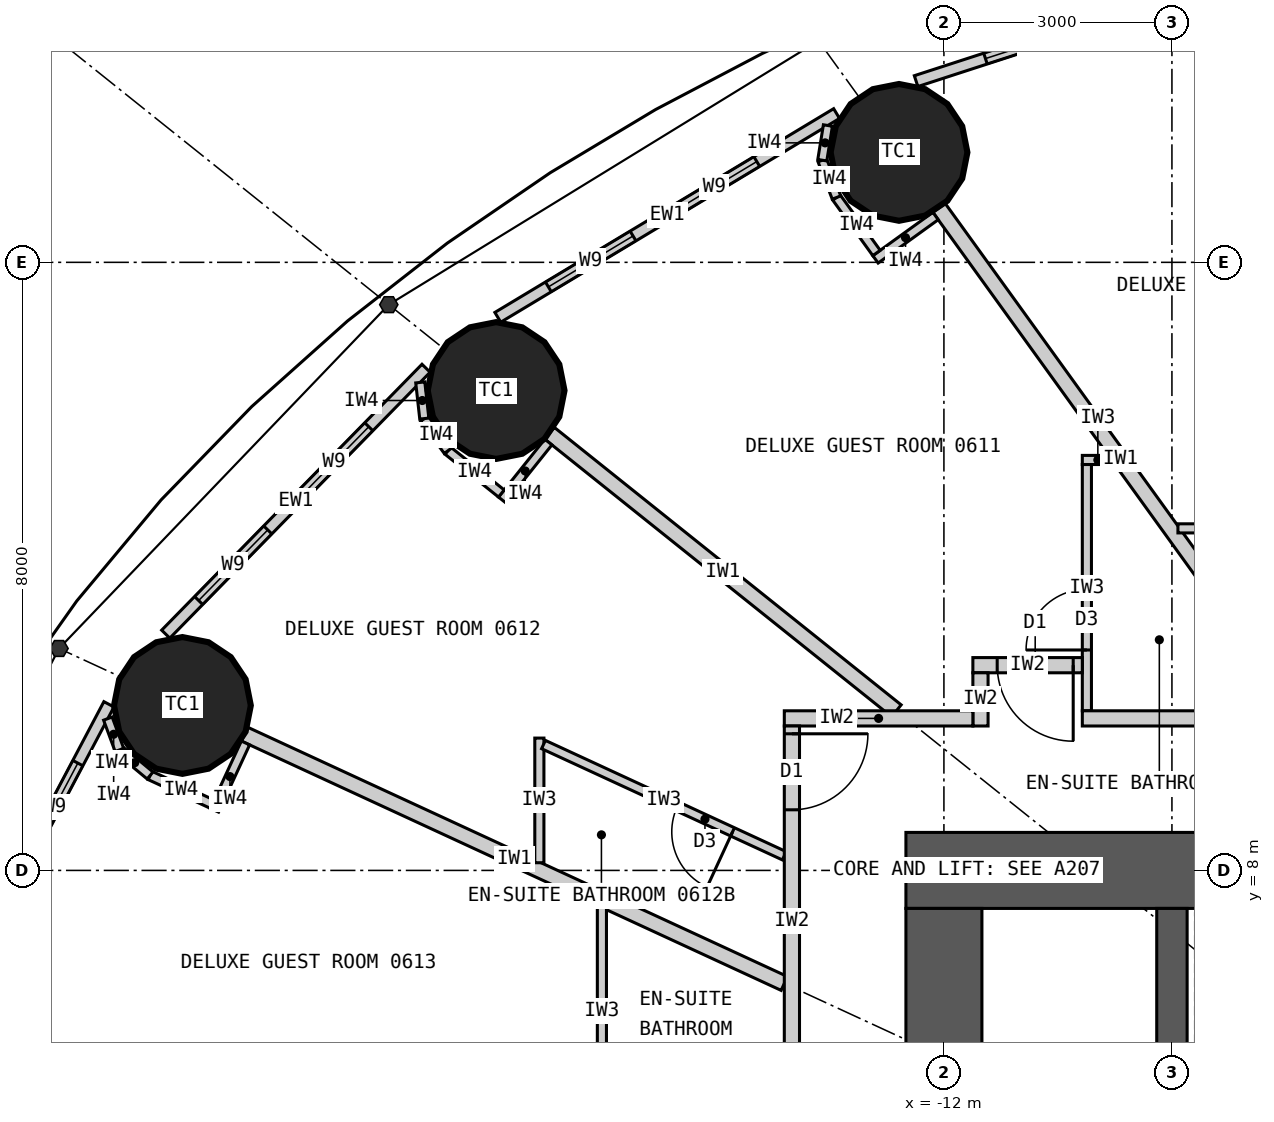
"""IFC4 building model, lengths in metres.
Left out: names, types, materials, properties, quantities, classifications, styles, units other than length and angle.
Written with IfcOpenShell. Run it as: python <this file> out.ifc"""

import sys

from ifc_helpers import new_model, si_unit, direction, frame, frame_2d, origin, origin_2d, place, context, subcontext, project, spatial, rectangle, circle, extrude, element, fill, save


model = new_model("IFC4")
c1 = context("Model", 3, precision=1e-05, world=origin(), true_north=direction((0.0, 1.0)))
c2 = subcontext(c1, "Body", "Model", "MODEL_VIEW")
j1 = project(units=[si_unit("LENGTHUNIT", "METRE"), si_unit("PLANEANGLEUNIT", "RADIAN")], contexts=[c1])
p1 = place(None, origin())
s1 = spatial("IfcSite", under=j1, at=p1, CompositionType="ELEMENT")
p2 = place(p1, origin())
s2 = spatial("IfcBuilding", under=s1, at=p2, CompositionType="ELEMENT")
p3 = place(p2, frame((0.0, 0.0, 32.7)))
s3 = spatial("IfcBuildingStorey", under=s2, at=p3, CompositionType="ELEMENT", Elevation=32.7)
for number, where, z_axis, x_axis in (
    (1, (-12.591, 17.447, 0.0), (0.0, 0.0, 1.0), (1.0, 0.0, 0.0)),
    (2, (-17.892, 14.313, 0.0), (0.0, 0.0, 1.0), (1.0, 0.0, 0.0)),
    (3, (-22.019, 10.17, 0.0), (0.0, 0.0, 1.0), (1.0, 0.0, 0.0)),
):
    element("IfcColumn", number, at=place(p3, frame(where, z_axis=z_axis, x_axis=x_axis)), inside=s3, PredefinedType="COLUMN", context=c2, shape_type="SweptSolid", body=[
        extrude(circle(Radius=0.9, at=origin_2d()), origin(), (0.0, 0.0, 1.0), 3.3),
    ])
p4 = place(p3, frame((-12.5, 8.0, 0.0), z_axis=(0.0, 0.0, 1.0), x_axis=(1.0, 0.0, 0.0)))
e4 = element("IfcWall", 4, at=p4, inside=s3, PredefinedType="SHEAR", context=c2, shape_type="SweptSolid", body=[
    extrude(rectangle(XDim=25.0, YDim=1.0, at=frame_2d((12.5, 0.0))), origin(), (0.0, 0.0, 1.0), 3.3),
])
p5 = place(p4, frame((11.2, 0.0, 0.0)))
e5 = element("IfcOpeningElement", 5, at=p5, cuts=e4, PredefinedType="OPENING", context=c2, shape_type="SweptSolid", body=[
    extrude(rectangle(XDim=1.2, YDim=2.2, at=frame_2d((0.6, 1.1))), frame((0.0, 0.51, 0.0), z_axis=(0.0, -1.0, 0.0), x_axis=(1.0, 0.0, 0.0)), (0.0, 0.0, 1.0), 1.02),
])
p6 = place(p4, frame((18.8, 0.0, 0.0)))
e6 = element("IfcOpeningElement", 6, at=p6, cuts=e4, PredefinedType="OPENING", context=c2, shape_type="SweptSolid", body=[
    extrude(rectangle(XDim=0.9, YDim=2.2, at=frame_2d((0.45, 1.1))), frame((0.0, 0.51, 0.0), z_axis=(0.0, -1.0, 0.0), x_axis=(1.0, 0.0, 0.0)), (0.0, 0.0, 1.0), 1.02),
])
p7 = place(p3, frame((-12.0, 7.5, 0.0), z_axis=(0.0, 0.0, 1.0), x_axis=(0.0, -1.0, 0.0)))
e7 = element("IfcWall", 7, at=p7, inside=s3, PredefinedType="SHEAR", context=c2, shape_type="SweptSolid", body=[
    extrude(rectangle(XDim=15.0, YDim=1.0, at=frame_2d((7.5, 0.0))), origin(), (0.0, 0.0, 1.0), 3.3),
])
p8 = place(p7, frame((6.6, 0.0, 0.0)))
e8 = element("IfcOpeningElement", 8, at=p8, cuts=e7, PredefinedType="OPENING", context=c2, shape_type="SweptSolid", body=[
    extrude(rectangle(XDim=1.8, YDim=2.2, at=frame_2d((0.9, 1.1))), frame((0.0, 0.51, 0.0), z_axis=(0.0, -1.0, 0.0), x_axis=(1.0, 0.0, 0.0)), (0.0, 0.0, 1.0), 1.02),
])
p9 = place(p3, frame((-9.0, 4.5, 0.0), z_axis=(0.0, 0.0, 1.0), x_axis=(0.0, 1.0, 0.0)))
e9 = element("IfcWall", 9, at=p9, inside=s3, PredefinedType="SHEAR", context=c2, shape_type="SweptSolid", body=[
    extrude(rectangle(XDim=3.0, YDim=0.4, at=frame_2d((1.5, 0.0))), origin(), (0.0, 0.0, 1.0), 3.3),
])
p10 = place(p3, frame((-7.188, 20.065, 0.0), z_axis=(0.0, 0.0, 1.0), x_axis=(-0.951138486029, -0.308764603532, 0.0)))
e10 = element("IfcWall", 10, at=p10, inside=s3, PredefinedType="ELEMENTEDWALL", context=c2, shape_type="SweptSolid", body=[
    extrude(rectangle(XDim=5.444, YDim=0.15, at=frame_2d((2.722, 0.0))), origin(), (0.0, 0.0, 1.0), 3.12),
])
p11 = place(p10, frame((1.284, 0.0, 0.9)))
e11 = element("IfcOpeningElement", 11, at=p11, cuts=e10, PredefinedType="OPENING", context=c2, shape_type="SweptSolid", body=[
    extrude(rectangle(XDim=1.3, YDim=1.9, at=frame_2d((0.65, 0.95))), frame((0.0, 0.085, 0.0), z_axis=(0.0, -1.0, 0.0), x_axis=(1.0, 0.0, 0.0)), (0.0, 0.0, 1.0), 0.17),
])
p12 = place(p10, frame((3.184, 0.0, 0.9)))
e12 = element("IfcOpeningElement", 12, at=p12, cuts=e10, PredefinedType="OPENING", context=c2, shape_type="SweptSolid", body=[
    extrude(rectangle(XDim=1.3, YDim=1.9, at=frame_2d((0.65, 0.95))), frame((0.0, 0.085, 0.0), z_axis=(0.0, -1.0, 0.0), x_axis=(1.0, 0.0, 0.0)), (0.0, 0.0, 1.0), 0.17),
])
p13 = place(p3, frame((-13.412, 17.957, 0.0), z_axis=(0.0, 0.0, 1.0), x_axis=(-0.856958191554, -0.515385931054, 0.0)))
e13 = element("IfcWall", 13, at=p13, inside=s3, PredefinedType="ELEMENTEDWALL", context=c2, shape_type="SweptSolid", body=[
    extrude(rectangle(XDim=5.201, YDim=0.15, at=frame_2d((2.601, 0.0))), origin(), (0.0, 0.0, 1.0), 3.12),
])
p14 = place(p13, frame((1.225, 0.0, 0.9)))
e14 = element("IfcOpeningElement", 14, at=p14, cuts=e13, PredefinedType="OPENING", context=c2, shape_type="SweptSolid", body=[
    extrude(rectangle(XDim=1.3, YDim=1.9, at=frame_2d((0.65, 0.95))), frame((0.0, 0.085, 0.0), z_axis=(0.0, -1.0, 0.0), x_axis=(1.0, 0.0, 0.0)), (0.0, 0.0, 1.0), 0.17),
])
p15 = place(p13, frame((3.125, 0.0, 0.9)))
e15 = element("IfcOpeningElement", 15, at=p15, cuts=e13, PredefinedType="OPENING", context=c2, shape_type="SweptSolid", body=[
    extrude(rectangle(XDim=1.3, YDim=1.9, at=frame_2d((0.65, 0.95))), frame((0.0, 0.085, 0.0), z_axis=(0.0, -1.0, 0.0), x_axis=(1.0, 0.0, 0.0)), (0.0, 0.0, 1.0), 0.17),
])
p16 = place(p3, frame((-18.813, 14.607, 0.0), z_axis=(0.0, 0.0, 1.0), x_axis=(-0.699612594083, -0.714522370679, 0.0)))
e16 = element("IfcWall", 16, at=p16, inside=s3, PredefinedType="ELEMENTEDWALL", context=c2, shape_type="SweptSolid", body=[
    extrude(rectangle(XDim=4.896, YDim=0.15, at=frame_2d((2.448, 0.0))), origin(), (0.0, 0.0, 1.0), 3.12),
])
p17 = place(p16, frame((1.077, 0.0, 0.9)))
e17 = element("IfcOpeningElement", 17, at=p17, cuts=e16, PredefinedType="OPENING", context=c2, shape_type="SweptSolid", body=[
    extrude(rectangle(XDim=1.3, YDim=1.9, at=frame_2d((0.65, 0.95))), frame((0.0, 0.085, 0.0), z_axis=(0.0, -1.0, 0.0), x_axis=(1.0, 0.0, 0.0)), (0.0, 0.0, 1.0), 0.17),
])
p18 = place(p16, frame((2.977, 0.0, 0.9)))
e18 = element("IfcOpeningElement", 18, at=p18, cuts=e16, PredefinedType="OPENING", context=c2, shape_type="SweptSolid", body=[
    extrude(rectangle(XDim=1.3, YDim=1.9, at=frame_2d((0.65, 0.95))), frame((0.0, 0.085, 0.0), z_axis=(0.0, -1.0, 0.0), x_axis=(1.0, 0.0, 0.0)), (0.0, 0.0, 1.0), 0.17),
])
p19 = place(p3, frame((-22.986, 10.185, 0.0), z_axis=(0.0, 0.0, 1.0), x_axis=(-0.467303182954, -0.884097129959, 0.0)))
e19 = element("IfcWall", 19, at=p19, inside=s3, PredefinedType="ELEMENTEDWALL", context=c2, shape_type="SweptSolid", body=[
    extrude(rectangle(XDim=4.606, YDim=0.15, at=frame_2d((2.303, 0.0))), origin(), (0.0, 0.0, 1.0), 3.12),
])
p20 = place(p19, frame((0.875, 0.0, 0.9)))
e20 = element("IfcOpeningElement", 20, at=p20, cuts=e19, PredefinedType="OPENING", context=c2, shape_type="SweptSolid", body=[
    extrude(rectangle(XDim=1.3, YDim=1.9, at=frame_2d((0.65, 0.95))), frame((0.0, 0.085, 0.0), z_axis=(0.0, -1.0, 0.0), x_axis=(1.0, 0.0, 0.0)), (0.0, 0.0, 1.0), 0.17),
])
p21 = place(p19, frame((2.775, 0.0, 0.9)))
e21 = element("IfcOpeningElement", 21, at=p21, cuts=e19, PredefinedType="OPENING", context=c2, shape_type="SweptSolid", body=[
    extrude(rectangle(XDim=1.3, YDim=1.9, at=frame_2d((0.65, 0.95))), frame((0.0, 0.085, 0.0), z_axis=(0.0, -1.0, 0.0), x_axis=(1.0, 0.0, 0.0)), (0.0, 0.0, 1.0), 0.17),
])
p22 = place(p3, frame((-7.289, 10.1, 0.0), z_axis=(0.0, 0.0, 1.0), x_axis=(-0.585216319319, 0.810877216108, 0.0)))
e22 = element("IfcWall", 22, at=p22, inside=s3, PredefinedType="PARTITIONING", context=c2, shape_type="SweptSolid", body=[
    extrude(rectangle(XDim=8.16, YDim=0.2, at=frame_2d((4.08, 0.0))), origin(), (0.0, 0.0, 1.0), 2.32),
])
p23 = place(p3, frame((-12.625, 10.1, 0.0), z_axis=(0.0, 0.0, 1.0), x_axis=(-0.780872884676, 0.624689953479, 0.0)))
e23 = element("IfcWall", 23, at=p23, inside=s3, PredefinedType="PARTITIONING", context=c2, shape_type="SweptSolid", body=[
    extrude(rectangle(XDim=5.845, YDim=0.2, at=frame_2d((2.922, 0.0))), origin(), (0.0, 0.0, 1.0), 2.32),
])
p24 = place(p3, frame((-14.1, 6.512, 0.0), z_axis=(0.0, 0.0, 1.0), x_axis=(-0.907842433118, 0.41931147925, 0.0)))
e24 = element("IfcWall", 24, at=p24, inside=s3, PredefinedType="PARTITIONING", context=c2, shape_type="SweptSolid", body=[
    extrude(rectangle(XDim=7.823, YDim=0.2, at=frame_2d((3.912, 0.0))), origin(), (0.0, 0.0, 1.0), 2.32),
])
p25 = place(p3, frame((-8.921, 12.5, 0.0), z_axis=(0.0, 0.0, 1.0), x_axis=(1.0, 0.0, 0.0)))
e25 = element("IfcWall", 25, at=p25, inside=s3, PredefinedType="PARTITIONING", context=c2, shape_type="SweptSolid", body=[
    extrude(rectangle(XDim=3.372, YDim=0.12, at=frame_2d((1.686, 0.0))), origin(), (0.0, 0.0, 1.0), 3.12),
])
p26 = place(p3, frame((-9.771, 13.4, 0.0), z_axis=(0.0, 0.0, 1.0), x_axis=(-1.0, 0.0, 0.0)))
e26 = element("IfcWall", 26, at=p26, inside=s3, PredefinedType="PARTITIONING", context=c2, shape_type="SweptSolid", body=[
    extrude(rectangle(XDim=0.408, YDim=0.12, at=frame_2d((0.204, 0.0))), origin(), (0.0, 0.0, 1.0), 3.12),
])
p27 = place(p3, frame((-10.119, 10.1, 0.0), z_axis=(0.0, 0.0, 1.0), x_axis=(0.0, 1.0, 0.0)))
e27 = element("IfcWall", 27, at=p27, inside=s3, PredefinedType="PARTITIONING", context=c2, shape_type="SweptSolid", body=[
    extrude(rectangle(XDim=3.24, YDim=0.12, at=frame_2d((1.62, 0.0))), origin(), (0.0, 0.0, 1.0), 3.12),
])
p28 = place(p27, frame((0.8, 0.0, 0.0)))
e28 = element("IfcOpeningElement", 28, at=p28, cuts=e27, PredefinedType="OPENING", context=c2, shape_type="SweptSolid", body=[
    extrude(rectangle(XDim=0.8, YDim=2.1, at=frame_2d((0.4, 1.05))), frame((0.0, 0.07, 0.0), z_axis=(0.0, -1.0, 0.0), x_axis=(1.0, 0.0, 0.0)), (0.0, 0.0, 1.0), 0.14),
])
p29 = place(p3, frame((-17.323, 8.101, 0.0), z_axis=(0.0, 0.0, 1.0), x_axis=(0.0, 1.0, 0.0)))
e29 = element("IfcWall", 29, at=p29, inside=s3, PredefinedType="PARTITIONING", context=c2, shape_type="SweptSolid", body=[
    extrude(rectangle(XDim=1.64, YDim=0.12, at=frame_2d((0.82, 0.0))), origin(), (0.0, 0.0, 1.0), 3.12),
])
p30 = place(p3, frame((-14.1, 8.193, 0.0), z_axis=(0.0, 0.0, 1.0), x_axis=(-0.907836493557, 0.419324338628, 0.0)))
e30 = element("IfcWall", 30, at=p30, inside=s3, PredefinedType="PARTITIONING", context=c2, shape_type="SweptSolid", body=[
    extrude(rectangle(XDim=3.49, YDim=0.12, at=frame_2d((1.745, 0.0))), origin(), (0.0, 0.0, 1.0), 3.12),
])
p31 = place(p30, frame((0.75, 0.0, 0.0)))
e31 = element("IfcOpeningElement", 31, at=p31, cuts=e30, PredefinedType="OPENING", context=c2, shape_type="SweptSolid", body=[
    extrude(rectangle(XDim=0.8, YDim=2.1, at=frame_2d((0.4, 1.05))), frame((0.0, 0.07, 0.0), z_axis=(0.0, -1.0, 0.0), x_axis=(1.0, 0.0, 0.0)), (0.0, 0.0, 1.0), 0.14),
])
p32 = place(p3, frame((-16.5, 7.521, 0.0), z_axis=(0.0, 0.0, 1.0), x_axis=(0.0, -1.0, 0.0)))
e32 = element("IfcWall", 32, at=p32, inside=s3, PredefinedType="PARTITIONING", context=c2, shape_type="SweptSolid", body=[
    extrude(rectangle(XDim=2.749, YDim=0.12, at=frame_2d((1.374, 0.0))), origin(), (0.0, 0.0, 1.0), 3.12),
])
p33 = place(p3, frame((-11.619, 10.7, 0.0), z_axis=(0.0, 0.0, 1.0), x_axis=(1.0, 0.0, 0.0)))
e33 = element("IfcWall", 33, at=p33, inside=s3, PredefinedType="PARTITIONING", context=c2, shape_type="SweptSolid", body=[
    extrude(rectangle(XDim=1.44, YDim=0.2, at=frame_2d((0.72, 0.0))), origin(), (0.0, 0.0, 1.0), 3.12),
])
p34 = place(p33, frame((0.32, 0.0, 0.0)))
e34 = element("IfcOpeningElement", 34, at=p34, cuts=e33, PredefinedType="OPENING", context=c2, shape_type="SweptSolid", body=[
    extrude(rectangle(XDim=1.0, YDim=2.2, at=frame_2d((0.5, 1.1))), frame((0.0, 0.11, 0.0), z_axis=(0.0, -1.0, 0.0), x_axis=(1.0, 0.0, 0.0)), (0.0, 0.0, 1.0), 0.22),
])
p35 = place(p3, frame((-11.519, 9.9, 0.0), z_axis=(0.0, 0.0, 1.0), x_axis=(0.0, 1.0, 0.0)))
e35 = element("IfcWall", 35, at=p35, inside=s3, PredefinedType="PARTITIONING", context=c2, shape_type="SweptSolid", body=[
    extrude(rectangle(XDim=0.7, YDim=0.2, at=frame_2d((0.35, 0.0))), origin(), (0.0, 0.0, 1.0), 3.12),
])
p36 = place(p3, frame((-14.1, 10.0, 0.0), z_axis=(0.0, 0.0, 1.0), x_axis=(1.0, 0.0, 0.0)))
e36 = element("IfcWall", 36, at=p36, inside=s3, PredefinedType="PARTITIONING", context=c2, shape_type="SweptSolid", body=[
    extrude(rectangle(XDim=2.481, YDim=0.2, at=frame_2d((1.24, 0.0))), origin(), (0.0, 0.0, 1.0), 3.12),
])
p37 = place(p3, frame((-10.179, 10.0, 0.0), z_axis=(0.0, 0.0, 1.0), x_axis=(1.0, 0.0, 0.0)))
e37 = element("IfcWall", 37, at=p37, inside=s3, PredefinedType="PARTITIONING", context=c2, shape_type="SweptSolid", body=[
    extrude(rectangle(XDim=4.63, YDim=0.2, at=frame_2d((2.315, 0.0))), origin(), (0.0, 0.0, 1.0), 3.12),
])
p38 = place(p3, frame((-14.0, 9.9, 0.0), z_axis=(0.0, 0.0, 1.0), x_axis=(0.0, -1.0, 0.0)))
e38 = element("IfcWall", 38, at=p38, inside=s3, PredefinedType="PARTITIONING", context=c2, shape_type="SweptSolid", body=[
    extrude(rectangle(XDim=5.127, YDim=0.2, at=frame_2d((2.564, 0.0))), origin(), (0.0, 0.0, 1.0), 3.12),
])
p39 = place(p38, frame((0.103, 0.0, 0.0)))
e39 = element("IfcOpeningElement", 39, at=p39, cuts=e38, PredefinedType="OPENING", context=c2, shape_type="SweptSolid", body=[
    extrude(rectangle(XDim=1.0, YDim=2.2, at=frame_2d((0.5, 1.1))), frame((0.0, 0.11, 0.0), z_axis=(0.0, -1.0, 0.0), x_axis=(1.0, 0.0, 0.0)), (0.0, 0.0, 1.0), 0.22),
])
p40 = place(p3, frame((-12.11, 16.609, 0.0), z_axis=(0.0, 0.0, 1.0), x_axis=(-0.810897160646, -0.585188683123, 0.0)))
e40 = element("IfcWall", 40, at=p40, inside=s3, PredefinedType="PARTITIONING", context=c2, shape_type="SweptSolid", body=[
    extrude(rectangle(XDim=0.975, YDim=0.12, at=frame_2d((0.487, 0.0))), origin(), (0.0, 0.0, 1.0), 3.12),
])
p41 = place(p3, frame((-12.887, 16.123, 0.0), z_axis=(0.0, 0.0, 1.0), x_axis=(-0.585054732094, 0.810993810367, 0.0)))
e41 = element("IfcWall", 41, at=p41, inside=s3, PredefinedType="PARTITIONING", context=c2, shape_type="SweptSolid", body=[
    extrude(rectangle(XDim=0.9, YDim=0.12, at=frame_2d((0.45, 0.0))), origin(), (0.0, 0.0, 1.0), 3.12),
])
p42 = place(p3, frame((-13.414, 16.853, 0.0), z_axis=(0.0, 0.0, 1.0), x_axis=(-0.355705277023, 0.934598178844, 0.0)))
e42 = element("IfcWall", 42, at=p42, inside=s3, PredefinedType="PARTITIONING", context=c2, shape_type="SweptSolid", body=[
    extrude(rectangle(XDim=0.525, YDim=0.12, at=frame_2d((0.263, 0.0))), origin(), (0.0, 0.0, 1.0), 3.12),
])
p43 = place(p3, frame((-13.6, 17.344, 0.0), z_axis=(0.0, 0.0, 1.0), x_axis=(0.15994604532, 0.987125758243, 0.0)))
e43 = element("IfcWall", 43, at=p43, inside=s3, PredefinedType="PARTITIONING", context=c2, shape_type="SweptSolid", body=[
    extrude(rectangle(XDim=0.462, YDim=0.12, at=frame_2d((0.231, 0.0))), origin(), (0.0, 0.0, 1.0), 3.12),
])
p44 = place(p3, frame((-17.205, 13.635, 0.0), z_axis=(0.0, 0.0, 1.0), x_axis=(-0.624756144097, -0.780819928289, 0.0)))
e44 = element("IfcWall", 44, at=p44, inside=s3, PredefinedType="PARTITIONING", context=c2, shape_type="SweptSolid", body=[
    extrude(rectangle(XDim=0.975, YDim=0.12, at=frame_2d((0.487, 0.0))), origin(), (0.0, 0.0, 1.0), 3.12),
])
p45 = place(p3, frame((-17.823, 12.959, 0.0), z_axis=(0.0, 0.0, 1.0), x_axis=(-0.780895271023, 0.624661969144, 0.0)))
e45 = element("IfcWall", 45, at=p45, inside=s3, PredefinedType="PARTITIONING", context=c2, shape_type="SweptSolid", body=[
    extrude(rectangle(XDim=0.9, YDim=0.12, at=frame_2d((0.45, 0.0))), origin(), (0.0, 0.0, 1.0), 3.12),
])
p46 = place(p3, frame((-18.526, 13.521, 0.0), z_axis=(0.0, 0.0, 1.0), x_axis=(-0.592532503205, 0.805546542818, 0.0)))
e46 = element("IfcWall", 46, at=p46, inside=s3, PredefinedType="PARTITIONING", context=c2, shape_type="SweptSolid", body=[
    extrude(rectangle(XDim=0.525, YDim=0.12, at=frame_2d((0.262, 0.0))), origin(), (0.0, 0.0, 1.0), 3.12),
])
p47 = place(p3, frame((-18.837, 13.944, 0.0), z_axis=(0.0, 0.0, 1.0), x_axis=(-0.110543348478, 0.993871303594, 0.0)))
e47 = element("IfcWall", 47, at=p47, inside=s3, PredefinedType="PARTITIONING", context=c2, shape_type="SweptSolid", body=[
    extrude(rectangle(XDim=0.479, YDim=0.12, at=frame_2d((0.24, 0.0))), origin(), (0.0, 0.0, 1.0), 3.12),
])
p48 = place(p3, frame((-21.189, 9.677, 0.0), z_axis=(0.0, 0.0, 1.0), x_axis=(-0.419344098106, -0.907827366509, 0.0)))
e48 = element("IfcWall", 48, at=p48, inside=s3, PredefinedType="PARTITIONING", context=c2, shape_type="SweptSolid", body=[
    extrude(rectangle(XDim=0.975, YDim=0.12, at=frame_2d((0.487, 0.0))), origin(), (0.0, 0.0, 1.0), 3.12),
])
p49 = place(p3, frame((-21.627, 8.872, 0.0), z_axis=(0.0, 0.0, 1.0), x_axis=(-0.907935564339, 0.419109783957, 0.0)))
e49 = element("IfcWall", 49, at=p49, inside=s3, PredefinedType="PARTITIONING", context=c2, shape_type="SweptSolid", body=[
    extrude(rectangle(XDim=0.9, YDim=0.12, at=frame_2d((0.45, 0.0))), origin(), (0.0, 0.0, 1.0), 3.12),
])
p50 = place(p3, frame((-22.445, 9.249, 0.0), z_axis=(0.0, 0.0, 1.0), x_axis=(-0.768335565584, 0.640047231584, 0.0)))
e50 = element("IfcWall", 50, at=p50, inside=s3, PredefinedType="PARTITIONING", context=c2, shape_type="SweptSolid", body=[
    extrude(rectangle(XDim=0.525, YDim=0.12, at=frame_2d((0.263, 0.0))), origin(), (0.0, 0.0, 1.0), 3.12),
])
p51 = place(p3, frame((-22.848, 9.585, 0.0), z_axis=(0.0, 0.0, 1.0), x_axis=(-0.345267312673, 0.938504386138, 0.0)))
e51 = element("IfcWall", 51, at=p51, inside=s3, PredefinedType="PARTITIONING", context=c2, shape_type="SweptSolid", body=[
    extrude(rectangle(XDim=0.439, YDim=0.12, at=frame_2d((0.22, 0.0))), origin(), (0.0, 0.0, 1.0), 3.12),
])
p52 = place(p12, origin())
e52 = element("IfcWindow", 52, at=p52, inside=s3, PartitioningType="SINGLE_PANEL", PredefinedType="WINDOW", context=c2, shape_type="SweptSolid", body=[
    extrude(rectangle(XDim=1.3, YDim=1.9, at=frame_2d((0.65, 0.95))), frame((0.0, 0.03, 0.0), z_axis=(0.0, -1.0, 0.0), x_axis=(1.0, 0.0, 0.0)), (0.0, 0.0, 1.0), 0.06),
])
fill(e12, e52)
p53 = place(p14, origin())
e53 = element("IfcWindow", 53, at=p53, inside=s3, PartitioningType="SINGLE_PANEL", PredefinedType="WINDOW", context=c2, shape_type="SweptSolid", body=[
    extrude(rectangle(XDim=1.3, YDim=1.9, at=frame_2d((0.65, 0.95))), frame((0.0, 0.03, 0.0), z_axis=(0.0, -1.0, 0.0), x_axis=(1.0, 0.0, 0.0)), (0.0, 0.0, 1.0), 0.06),
])
fill(e14, e53)
p54 = place(p15, origin())
e54 = element("IfcWindow", 54, at=p54, inside=s3, PartitioningType="SINGLE_PANEL", PredefinedType="WINDOW", context=c2, shape_type="SweptSolid", body=[
    extrude(rectangle(XDim=1.3, YDim=1.9, at=frame_2d((0.65, 0.95))), frame((0.0, 0.03, 0.0), z_axis=(0.0, -1.0, 0.0), x_axis=(1.0, 0.0, 0.0)), (0.0, 0.0, 1.0), 0.06),
])
fill(e15, e54)
p55 = place(p17, origin())
e55 = element("IfcWindow", 55, at=p55, inside=s3, PartitioningType="SINGLE_PANEL", PredefinedType="WINDOW", context=c2, shape_type="SweptSolid", body=[
    extrude(rectangle(XDim=1.3, YDim=1.9, at=frame_2d((0.65, 0.95))), frame((0.0, 0.03, 0.0), z_axis=(0.0, -1.0, 0.0), x_axis=(1.0, 0.0, 0.0)), (0.0, 0.0, 1.0), 0.06),
])
fill(e17, e55)
p56 = place(p18, origin())
e56 = element("IfcWindow", 56, at=p56, inside=s3, PartitioningType="SINGLE_PANEL", PredefinedType="WINDOW", context=c2, shape_type="SweptSolid", body=[
    extrude(rectangle(XDim=1.3, YDim=1.9, at=frame_2d((0.65, 0.95))), frame((0.0, 0.03, 0.0), z_axis=(0.0, -1.0, 0.0), x_axis=(1.0, 0.0, 0.0)), (0.0, 0.0, 1.0), 0.06),
])
fill(e18, e56)
p57 = place(p20, origin())
e57 = element("IfcWindow", 57, at=p57, inside=s3, PartitioningType="SINGLE_PANEL", PredefinedType="WINDOW", context=c2, shape_type="SweptSolid", body=[
    extrude(rectangle(XDim=1.3, YDim=1.9, at=frame_2d((0.65, 0.95))), frame((0.0, 0.03, 0.0), z_axis=(0.0, -1.0, 0.0), x_axis=(1.0, 0.0, 0.0)), (0.0, 0.0, 1.0), 0.06),
])
fill(e20, e57)
p58 = place(p28, origin())
e58 = element("IfcDoor", 58, at=p58, inside=s3, OperationType="SINGLE_SWING_LEFT", PredefinedType="DOOR", context=c2, shape_type="SweptSolid", body=[
    extrude(rectangle(XDim=0.8, YDim=2.1, at=frame_2d((0.4, 1.05))), frame((0.0, 0.025, 0.0), z_axis=(0.0, -1.0, 0.0), x_axis=(1.0, 0.0, 0.0)), (0.0, 0.0, 1.0), 0.05),
])
fill(e28, e58)
p59 = place(p34, origin())
e59 = element("IfcDoor", 59, at=p59, inside=s3, OperationType="SINGLE_SWING_RIGHT", PredefinedType="DOOR", context=c2, shape_type="SweptSolid", body=[
    extrude(rectangle(XDim=1.0, YDim=2.2, at=frame_2d((0.5, 1.1))), frame((0.0, 0.025, 0.0), z_axis=(0.0, -1.0, 0.0), x_axis=(1.0, 0.0, 0.0)), (0.0, 0.0, 1.0), 0.05),
])
fill(e34, e59)
p60 = place(p31, origin())
e60 = element("IfcDoor", 60, at=p60, inside=s3, OperationType="SINGLE_SWING_LEFT", PredefinedType="DOOR", context=c2, shape_type="SweptSolid", body=[
    extrude(rectangle(XDim=0.8, YDim=2.1, at=frame_2d((0.4, 1.05))), frame((0.0, 0.025, 0.0), z_axis=(0.0, -1.0, 0.0), x_axis=(1.0, 0.0, 0.0)), (0.0, 0.0, 1.0), 0.05),
])
fill(e31, e60)
p61 = place(p39, origin())
e61 = element("IfcDoor", 61, at=p61, inside=s3, OperationType="SINGLE_SWING_LEFT", PredefinedType="DOOR", context=c2, shape_type="SweptSolid", body=[
    extrude(rectangle(XDim=1.0, YDim=2.2, at=frame_2d((0.5, 1.1))), frame((0.0, 0.025, 0.0), z_axis=(0.0, -1.0, 0.0), x_axis=(1.0, 0.0, 0.0)), (0.0, 0.0, 1.0), 0.05),
])
fill(e39, e61)
save(model, sys.argv[1])
